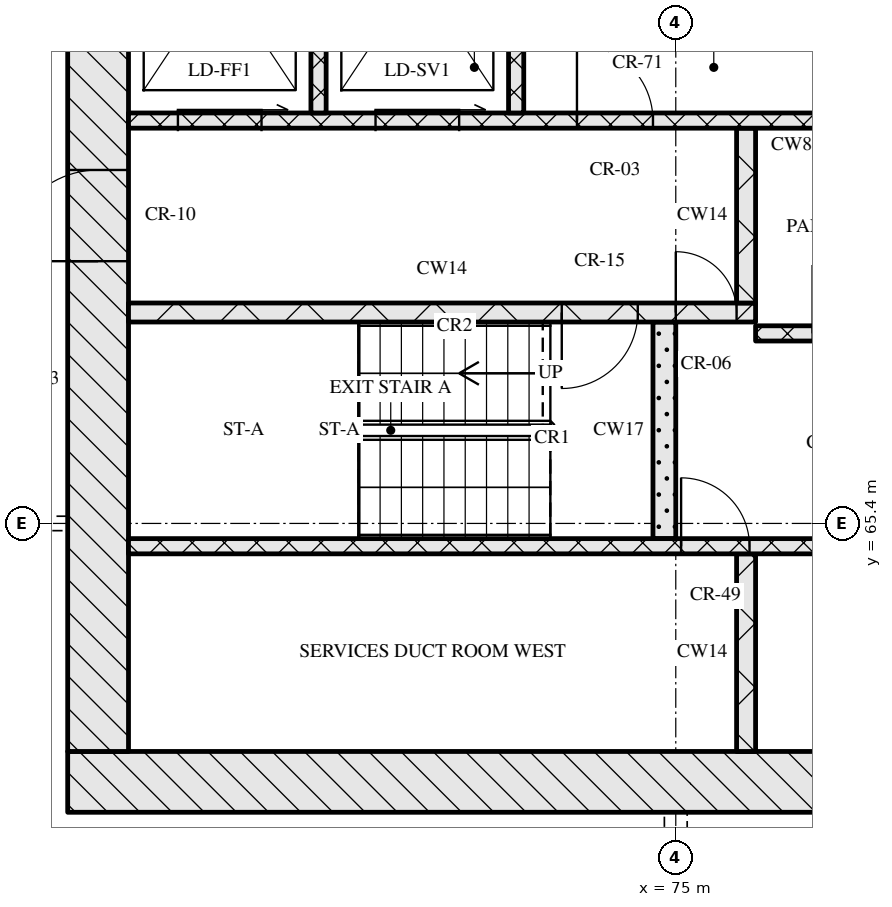
"""IFC4 building model, lengths in metres.
Left out: names, types, materials, properties, quantities, classifications, styles, units other than length and angle.
Written with IfcOpenShell. Run it as: python <this file> out.ifc"""

import sys

from ifc_helpers import new_model, si_unit, direction, frame, frame_2d, origin, place, context, subcontext, project, spatial, rectangle, extrude, element, fill, save


model = new_model("IFC4")
c1 = context("Model", 3, precision=1e-05, world=origin(), true_north=direction((0.0, 1.0)))
c2 = subcontext(c1, "Body", "Model", "MODEL_VIEW")
j1 = project(units=[si_unit("LENGTHUNIT", "METRE"), si_unit("PLANEANGLEUNIT", "RADIAN")], contexts=[c1])
p1 = place(None, origin())
s1 = spatial("IfcSite", under=j1, at=p1, CompositionType="ELEMENT")
p2 = place(p1, origin())
s2 = spatial("IfcBuilding", under=s1, at=p2, CompositionType="ELEMENT")
p3 = place(p2, frame((0.0, 0.0, 187.05)))
s3 = spatial("IfcBuildingStorey", under=s2, at=p3, CompositionType="ELEMENT", Elevation=187.05)
p4 = place(p3, frame((67.0, 62.0, 0.0), z_axis=(0.0, 0.0, 1.0), x_axis=(1.0, 0.0, 0.0)))
e1 = element("IfcWall", 1, at=p4, inside=s3, PredefinedType="SOLIDWALL", context=c2, shape_type="SweptSolid", body=[
    extrude(rectangle(XDim=41.2, YDim=0.8, at=frame_2d((20.6, 0.0))), origin(), (0.0, 0.0, 1.0), 3.32),
])
p5 = place(p4, frame((20.95, 0.0, 0.0)))
e2 = element("IfcOpeningElement", 2, at=p5, cuts=e1, PredefinedType="OPENING", context=c2, shape_type="SweptSolid", body=[
    extrude(rectangle(XDim=1.8, YDim=2.1, at=frame_2d((0.9, 1.05))), frame((0.0, 0.41, 0.0), z_axis=(0.0, -1.0, 0.0), x_axis=(1.0, 0.0, 0.0)), (0.0, 0.0, 1.0), 0.82),
])
p6 = place(p3, frame((67.4, 62.4, 0.0), z_axis=(0.0, 0.0, 1.0), x_axis=(0.0, 1.0, 0.0)))
e3 = element("IfcWall", 3, at=p6, inside=s3, PredefinedType="SOLIDWALL", context=c2, shape_type="SweptSolid", body=[
    extrude(rectangle(XDim=12.0, YDim=0.8, at=frame_2d((6.0, 0.0))), origin(), (0.0, 0.0, 1.0), 3.32),
])
p7 = place(p6, frame((6.45, 0.0, 0.0)))
e4 = element("IfcOpeningElement", 4, at=p7, cuts=e3, PredefinedType="OPENING", context=c2, shape_type="SweptSolid", body=[
    extrude(rectangle(XDim=1.2, YDim=2.1, at=frame_2d((0.6, 1.05))), frame((0.0, 0.41, 0.0), z_axis=(0.0, -1.0, 0.0), x_axis=(1.0, 0.0, 0.0)), (0.0, 0.0, 1.0), 0.82),
])
p8 = place(p3, frame((75.925, 62.4, 0.0), z_axis=(0.0, 0.0, 1.0), x_axis=(0.0, 1.0, 0.0)))
e5 = element("IfcWall", 5, at=p8, inside=s3, PredefinedType="SOLIDWALL", context=c2, shape_type="SweptSolid", body=[
    extrude(rectangle(XDim=2.6, YDim=0.25, at=frame_2d((1.3, 0.0))), origin(), (0.0, 0.0, 1.0), 3.32),
])
p9 = place(p3, frame((67.8, 65.1, 0.0), z_axis=(0.0, 0.0, 1.0), x_axis=(1.0, 0.0, 0.0)))
e6 = element("IfcWall", 6, at=p9, inside=s3, PredefinedType="SOLIDWALL", context=c2, shape_type="SweptSolid", body=[
    extrude(rectangle(XDim=18.5, YDim=0.2, at=frame_2d((9.25, 0.0))), origin(), (0.0, 0.0, 1.0), 3.32),
])
p10 = place(p9, frame((7.27, 0.0, 0.0)))
e7 = element("IfcOpeningElement", 7, at=p10, cuts=e6, PredefinedType="OPENING", context=c2, shape_type="SweptSolid", body=[
    extrude(rectangle(XDim=0.9, YDim=2.1, at=frame_2d((0.45, 1.05))), frame((0.0, 0.11, 0.0), z_axis=(0.0, -1.0, 0.0), x_axis=(1.0, 0.0, 0.0)), (0.0, 0.0, 1.0), 0.22),
])
p11 = place(p9, frame((9.65, 0.0, 0.0)))
e8 = element("IfcOpeningElement", 8, at=p11, cuts=e6, PredefinedType="OPENING", context=c2, shape_type="SweptSolid", body=[
    extrude(rectangle(XDim=0.9, YDim=2.1, at=frame_2d((0.45, 1.05))), frame((0.0, 0.11, 0.0), z_axis=(0.0, -1.0, 0.0), x_axis=(1.0, 0.0, 0.0)), (0.0, 0.0, 1.0), 0.22),
])
p12 = place(p9, frame((13.36, 0.0, 0.0)))
e9 = element("IfcOpeningElement", 9, at=p12, cuts=e6, PredefinedType="OPENING", context=c2, shape_type="SweptSolid", body=[
    extrude(rectangle(XDim=0.9, YDim=2.1, at=frame_2d((0.45, 1.05))), frame((0.0, 0.11, 0.0), z_axis=(0.0, -1.0, 0.0), x_axis=(1.0, 0.0, 0.0)), (0.0, 0.0, 1.0), 0.22),
])
p13 = place(p9, frame((16.7, 0.0, 0.0)))
e10 = element("IfcOpeningElement", 10, at=p13, cuts=e6, PredefinedType="OPENING", context=c2, shape_type="SweptSolid", body=[
    extrude(rectangle(XDim=0.9, YDim=2.1, at=frame_2d((0.45, 1.05))), frame((0.0, 0.11, 0.0), z_axis=(0.0, -1.0, 0.0), x_axis=(1.0, 0.0, 0.0)), (0.0, 0.0, 1.0), 0.22),
])
p14 = place(p3, frame((74.85, 65.2, 0.0), z_axis=(0.0, 0.0, 1.0), x_axis=(0.0, 1.0, 0.0)))
e11 = element("IfcWall", 11, at=p14, inside=s3, PredefinedType="SOLIDWALL", context=c2, shape_type="SweptSolid", body=[
    extrude(rectangle(XDim=2.85, YDim=0.3, at=frame_2d((1.425, 0.0))), origin(), (0.0, 0.0, 1.0), 3.32),
])
p15 = place(p3, frame((76.05, 67.9, 0.0), z_axis=(0.0, 0.0, 1.0), x_axis=(1.0, 0.0, 0.0)))
e12 = element("IfcWall", 12, at=p15, inside=s3, PredefinedType="SOLIDWALL", context=c2, shape_type="SweptSolid", body=[
    extrude(rectangle(XDim=23.1, YDim=0.2, at=frame_2d((11.55, 0.0))), origin(), (0.0, 0.0, 1.0), 3.32),
])
p16 = place(p15, frame((0.75, 0.0, 0.0)))
e13 = element("IfcOpeningElement", 13, at=p16, cuts=e12, PredefinedType="OPENING", context=c2, shape_type="SweptSolid", body=[
    extrude(rectangle(XDim=0.9, YDim=2.1, at=frame_2d((0.45, 1.05))), frame((0.0, 0.11, 0.0), z_axis=(0.0, -1.0, 0.0), x_axis=(1.0, 0.0, 0.0)), (0.0, 0.0, 1.0), 0.22),
])
p17 = place(p15, frame((3.32, 0.0, 0.0)))
e14 = element("IfcOpeningElement", 14, at=p17, cuts=e12, PredefinedType="OPENING", context=c2, shape_type="SweptSolid", body=[
    extrude(rectangle(XDim=0.9, YDim=2.1, at=frame_2d((0.45, 1.05))), frame((0.0, 0.11, 0.0), z_axis=(0.0, -1.0, 0.0), x_axis=(1.0, 0.0, 0.0)), (0.0, 0.0, 1.0), 0.22),
])
p18 = place(p15, frame((5.77, 0.0, 0.0)))
e15 = element("IfcOpeningElement", 15, at=p18, cuts=e12, PredefinedType="OPENING", context=c2, shape_type="SweptSolid", body=[
    extrude(rectangle(XDim=0.9, YDim=2.1, at=frame_2d((0.45, 1.05))), frame((0.0, 0.11, 0.0), z_axis=(0.0, -1.0, 0.0), x_axis=(1.0, 0.0, 0.0)), (0.0, 0.0, 1.0), 0.22),
])
p19 = place(p15, frame((8.45, 0.0, 0.0)))
e16 = element("IfcOpeningElement", 16, at=p19, cuts=e12, PredefinedType="OPENING", context=c2, shape_type="SweptSolid", body=[
    extrude(rectangle(XDim=0.9, YDim=2.1, at=frame_2d((0.45, 1.05))), frame((0.0, 0.11, 0.0), z_axis=(0.0, -1.0, 0.0), x_axis=(1.0, 0.0, 0.0)), (0.0, 0.0, 1.0), 0.22),
])
p20 = place(p15, frame((10.91, 0.0, 0.0)))
e17 = element("IfcOpeningElement", 17, at=p20, cuts=e12, PredefinedType="OPENING", context=c2, shape_type="SweptSolid", body=[
    extrude(rectangle(XDim=0.9, YDim=2.1, at=frame_2d((0.45, 1.05))), frame((0.0, 0.11, 0.0), z_axis=(0.0, -1.0, 0.0), x_axis=(1.0, 0.0, 0.0)), (0.0, 0.0, 1.0), 0.22),
])
p21 = place(p15, frame((13.55, 0.0, 0.0)))
e18 = element("IfcOpeningElement", 18, at=p21, cuts=e12, PredefinedType="OPENING", context=c2, shape_type="SweptSolid", body=[
    extrude(rectangle(XDim=1.0, YDim=2.1, at=frame_2d((0.5, 1.05))), frame((0.0, 0.11, 0.0), z_axis=(0.0, -1.0, 0.0), x_axis=(1.0, 0.0, 0.0)), (0.0, 0.0, 1.0), 0.22),
])
p22 = place(p15, frame((16.2, 0.0, 0.0)))
e19 = element("IfcOpeningElement", 19, at=p22, cuts=e12, PredefinedType="OPENING", context=c2, shape_type="SweptSolid", body=[
    extrude(rectangle(XDim=1.1, YDim=2.1, at=frame_2d((0.55, 1.05))), frame((0.0, 0.11, 0.0), z_axis=(0.0, -1.0, 0.0), x_axis=(1.0, 0.0, 0.0)), (0.0, 0.0, 1.0), 0.22),
])
p23 = place(p15, frame((18.7, 0.0, 0.0)))
e20 = element("IfcOpeningElement", 20, at=p23, cuts=e12, PredefinedType="OPENING", context=c2, shape_type="SweptSolid", body=[
    extrude(rectangle(XDim=1.1, YDim=2.1, at=frame_2d((0.55, 1.05))), frame((0.0, 0.11, 0.0), z_axis=(0.0, -1.0, 0.0), x_axis=(1.0, 0.0, 0.0)), (0.0, 0.0, 1.0), 0.22),
])
p24 = place(p15, frame((21.2, 0.0, 0.0)))
e21 = element("IfcOpeningElement", 21, at=p24, cuts=e12, PredefinedType="OPENING", context=c2, shape_type="SweptSolid", body=[
    extrude(rectangle(XDim=1.1, YDim=2.1, at=frame_2d((0.55, 1.05))), frame((0.0, 0.11, 0.0), z_axis=(0.0, -1.0, 0.0), x_axis=(1.0, 0.0, 0.0)), (0.0, 0.0, 1.0), 0.22),
])
p25 = place(p3, frame((67.8, 68.175, 0.0), z_axis=(0.0, 0.0, 1.0), x_axis=(1.0, 0.0, 0.0)))
e22 = element("IfcWall", 22, at=p25, inside=s3, PredefinedType="SOLIDWALL", context=c2, shape_type="SweptSolid", body=[
    extrude(rectangle(XDim=8.25, YDim=0.25, at=frame_2d((4.125, 0.0))), origin(), (0.0, 0.0, 1.0), 3.32),
])
p26 = place(p25, frame((5.7, 0.0, 0.0)))
e23 = element("IfcOpeningElement", 23, at=p26, cuts=e22, PredefinedType="OPENING", context=c2, shape_type="SweptSolid", body=[
    extrude(rectangle(XDim=1.0, YDim=2.1, at=frame_2d((0.5, 1.05))), frame((0.0, 0.135, 0.0), z_axis=(0.0, -1.0, 0.0), x_axis=(1.0, 0.0, 0.0)), (0.0, 0.0, 1.0), 0.27),
])
p27 = place(p25, frame((7.2, 0.0, 0.0)))
e24 = element("IfcOpeningElement", 24, at=p27, cuts=e22, PredefinedType="OPENING", context=c2, shape_type="SweptSolid", body=[
    extrude(rectangle(XDim=0.8, YDim=2.1, at=frame_2d((0.4, 1.05))), frame((0.0, 0.135, 0.0), z_axis=(0.0, -1.0, 0.0), x_axis=(1.0, 0.0, 0.0)), (0.0, 0.0, 1.0), 0.27),
])
p28 = place(p3, frame((75.925, 68.3, 0.0), z_axis=(0.0, 0.0, 1.0), x_axis=(0.0, 1.0, 0.0)))
e25 = element("IfcWall", 25, at=p28, inside=s3, PredefinedType="SOLIDWALL", context=c2, shape_type="SweptSolid", body=[
    extrude(rectangle(XDim=2.3, YDim=0.25, at=frame_2d((1.15, 0.0))), origin(), (0.0, 0.0, 1.0), 3.32),
])
p29 = place(p3, frame((67.8, 70.7, 0.0), z_axis=(0.0, 0.0, 1.0), x_axis=(1.0, 0.0, 0.0)))
e26 = element("IfcWall", 26, at=p29, inside=s3, PredefinedType="SOLIDWALL", context=c2, shape_type="SweptSolid", body=[
    extrude(rectangle(XDim=39.6, YDim=0.2, at=frame_2d((19.8, 0.0))), origin(), (0.0, 0.0, 1.0), 3.32),
])
p30 = place(p29, frame((0.65, 0.0, 0.0)))
e27 = element("IfcOpeningElement", 27, at=p30, cuts=e26, PredefinedType="OPENING", context=c2, shape_type="SweptSolid", body=[
    extrude(rectangle(XDim=1.1, YDim=2.1, at=frame_2d((0.55, 1.05))), frame((0.0, 0.11, 0.0), z_axis=(0.0, -1.0, 0.0), x_axis=(1.0, 0.0, 0.0)), (0.0, 0.0, 1.0), 0.22),
])
p31 = place(p29, frame((3.25, 0.0, 0.0)))
e28 = element("IfcOpeningElement", 28, at=p31, cuts=e26, PredefinedType="OPENING", context=c2, shape_type="SweptSolid", body=[
    extrude(rectangle(XDim=1.1, YDim=2.1, at=frame_2d((0.55, 1.05))), frame((0.0, 0.11, 0.0), z_axis=(0.0, -1.0, 0.0), x_axis=(1.0, 0.0, 0.0)), (0.0, 0.0, 1.0), 0.22),
])
p32 = place(p29, frame((5.9, 0.0, 0.0)))
e29 = element("IfcOpeningElement", 29, at=p32, cuts=e26, PredefinedType="OPENING", context=c2, shape_type="SweptSolid", body=[
    extrude(rectangle(XDim=1.0, YDim=2.1, at=frame_2d((0.5, 1.05))), frame((0.0, 0.11, 0.0), z_axis=(0.0, -1.0, 0.0), x_axis=(1.0, 0.0, 0.0)), (0.0, 0.0, 1.0), 0.22),
])
p33 = place(p29, frame((21.7, 0.0, 0.0)))
e30 = element("IfcOpeningElement", 30, at=p33, cuts=e26, PredefinedType="OPENING", context=c2, shape_type="SweptSolid", body=[
    extrude(rectangle(XDim=1.0, YDim=2.1, at=frame_2d((0.5, 1.05))), frame((0.0, 0.11, 0.0), z_axis=(0.0, -1.0, 0.0), x_axis=(1.0, 0.0, 0.0)), (0.0, 0.0, 1.0), 0.22),
])
p34 = place(p29, frame((32.7, 0.0, 0.0)))
e31 = element("IfcOpeningElement", 31, at=p34, cuts=e26, PredefinedType="OPENING", context=c2, shape_type="SweptSolid", body=[
    extrude(rectangle(XDim=1.0, YDim=2.1, at=frame_2d((0.5, 1.05))), frame((0.0, 0.11, 0.0), z_axis=(0.0, -1.0, 0.0), x_axis=(1.0, 0.0, 0.0)), (0.0, 0.0, 1.0), 0.22),
])
p35 = place(p29, frame((35.25, 0.0, 0.0)))
e32 = element("IfcOpeningElement", 32, at=p35, cuts=e26, PredefinedType="OPENING", context=c2, shape_type="SweptSolid", body=[
    extrude(rectangle(XDim=1.1, YDim=2.1, at=frame_2d((0.55, 1.05))), frame((0.0, 0.11, 0.0), z_axis=(0.0, -1.0, 0.0), x_axis=(1.0, 0.0, 0.0)), (0.0, 0.0, 1.0), 0.22),
])
p36 = place(p29, frame((37.85, 0.0, 0.0)))
e33 = element("IfcOpeningElement", 33, at=p36, cuts=e26, PredefinedType="OPENING", context=c2, shape_type="SweptSolid", body=[
    extrude(rectangle(XDim=1.1, YDim=2.1, at=frame_2d((0.55, 1.05))), frame((0.0, 0.11, 0.0), z_axis=(0.0, -1.0, 0.0), x_axis=(1.0, 0.0, 0.0)), (0.0, 0.0, 1.0), 0.22),
])
p37 = place(p3, frame((70.3, 70.8, 0.0), z_axis=(0.0, 0.0, 1.0), x_axis=(0.0, 1.0, 0.0)))
e34 = element("IfcWall", 34, at=p37, inside=s3, PredefinedType="SOLIDWALL", context=c2, shape_type="SweptSolid", body=[
    extrude(rectangle(XDim=3.6, YDim=0.2, at=frame_2d((1.8, 0.0))), origin(), (0.0, 0.0, 1.0), 3.32),
])
p38 = place(p3, frame((72.9, 70.8, 0.0), z_axis=(0.0, 0.0, 1.0), x_axis=(0.0, 1.0, 0.0)))
e35 = element("IfcWall", 35, at=p38, inside=s3, PredefinedType="SOLIDWALL", context=c2, shape_type="SweptSolid", body=[
    extrude(rectangle(XDim=1.2, YDim=0.2, at=frame_2d((0.6, 0.0))), origin(), (0.0, 0.0, 1.0), 3.32),
])
p39 = place(p10, origin())
e36 = element("IfcDoor", 36, at=p39, inside=s3, OperationType="SINGLE_SWING_LEFT", PredefinedType="DOOR", context=c2, shape_type="SweptSolid", body=[
    extrude(rectangle(XDim=0.9, YDim=2.1, at=frame_2d((0.45, 1.05))), frame((0.0, 0.025, 0.0), z_axis=(0.0, -1.0, 0.0), x_axis=(1.0, 0.0, 0.0)), (0.0, 0.0, 1.0), 0.05),
])
fill(e7, e36)
p40 = place(p26, origin())
e37 = element("IfcDoor", 37, at=p40, inside=s3, OperationType="SINGLE_SWING_RIGHT", PredefinedType="DOOR", context=c2, shape_type="SweptSolid", body=[
    extrude(rectangle(XDim=1.0, YDim=2.1, at=frame_2d((0.5, 1.05))), frame((0.0, 0.025, 0.0), z_axis=(0.0, -1.0, 0.0), x_axis=(1.0, 0.0, 0.0)), (0.0, 0.0, 1.0), 0.05),
])
fill(e23, e37)
p41 = place(p27, origin())
e38 = element("IfcDoor", 38, at=p41, inside=s3, OperationType="SINGLE_SWING_LEFT", PredefinedType="DOOR", context=c2, shape_type="SweptSolid", body=[
    extrude(rectangle(XDim=0.8, YDim=2.1, at=frame_2d((0.4, 1.05))), frame((0.0, 0.025, 0.0), z_axis=(0.0, -1.0, 0.0), x_axis=(1.0, 0.0, 0.0)), (0.0, 0.0, 1.0), 0.05),
])
fill(e24, e38)
p42 = place(p7, origin())
e39 = element("IfcDoor", 39, at=p42, inside=s3, OperationType="SINGLE_SWING_LEFT", PredefinedType="DOOR", context=c2, shape_type="SweptSolid", body=[
    extrude(rectangle(XDim=1.2, YDim=2.1, at=frame_2d((0.6, 1.05))), frame((0.0, 0.025, 0.0), z_axis=(0.0, -1.0, 0.0), x_axis=(1.0, 0.0, 0.0)), (0.0, 0.0, 1.0), 0.05),
])
fill(e4, e39)
p43 = place(p30, origin())
e40 = element("IfcDoor", 40, at=p43, inside=s3, OperationType="SLIDING_TO_RIGHT", PredefinedType="DOOR", context=c2, shape_type="SweptSolid", body=[
    extrude(rectangle(XDim=1.1, YDim=2.1, at=frame_2d((0.55, 1.05))), frame((0.0, 0.025, 0.0), z_axis=(0.0, -1.0, 0.0), x_axis=(1.0, 0.0, 0.0)), (0.0, 0.0, 1.0), 0.05),
])
fill(e27, e40)
p44 = place(p31, origin())
e41 = element("IfcDoor", 41, at=p44, inside=s3, OperationType="SLIDING_TO_RIGHT", PredefinedType="DOOR", context=c2, shape_type="SweptSolid", body=[
    extrude(rectangle(XDim=1.1, YDim=2.1, at=frame_2d((0.55, 1.05))), frame((0.0, 0.025, 0.0), z_axis=(0.0, -1.0, 0.0), x_axis=(1.0, 0.0, 0.0)), (0.0, 0.0, 1.0), 0.05),
])
fill(e28, e41)
p45 = place(p32, origin())
e42 = element("IfcDoor", 42, at=p45, inside=s3, OperationType="SINGLE_SWING_LEFT", PredefinedType="DOOR", context=c2, shape_type="SweptSolid", body=[
    extrude(rectangle(XDim=1.0, YDim=2.1, at=frame_2d((0.5, 1.05))), frame((0.0, 0.025, 0.0), z_axis=(0.0, -1.0, 0.0), x_axis=(1.0, 0.0, 0.0)), (0.0, 0.0, 1.0), 0.05),
])
fill(e29, e42)
save(model, sys.argv[1])
